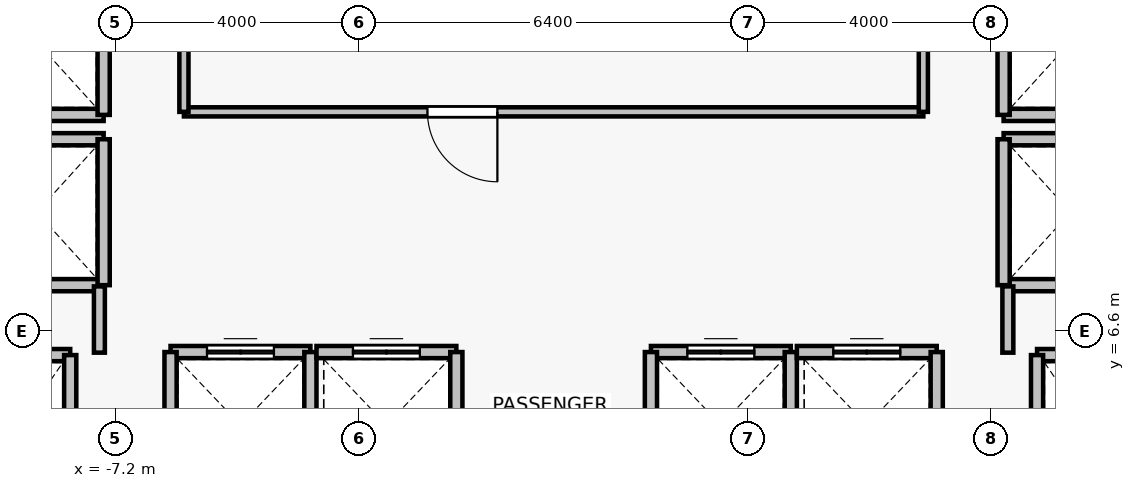
"""IFC4 building model, lengths in metres.
Left out: names, types, materials, properties, quantities, classifications, styles, units other than length and angle.
Written with IfcOpenShell. Run it as: python <this file> out.ifc"""

import sys

from ifc_helpers import new_model, si_unit, direction, frame, frame_2d, origin, place, context, subcontext, project, spatial, rectangle, extrude, source, transform, mapped, element, fill, save


model = new_model("IFC4")
c1 = context("Model", 3, precision=1e-05, world=origin(), true_north=direction((0.0, 1.0)))
c2 = subcontext(c1, "Body", "Model", "MODEL_VIEW")
j1 = project(units=[si_unit("LENGTHUNIT", "METRE"), si_unit("PLANEANGLEUNIT", "RADIAN")], contexts=[c1])
p1 = place(None, origin())
s1 = spatial("IfcSite", under=j1, at=p1, CompositionType="ELEMENT")
p2 = place(p1, origin())
s2 = spatial("IfcBuilding", under=s1, at=p2, CompositionType="ELEMENT")
p3 = place(p2, frame((0.0, 0.0, 126.4)))
s3 = spatial("IfcBuildingStorey", under=s2, at=p3, CompositionType="ELEMENT", Elevation=126.4)
p4 = place(p3, frame((-9.95, 6.2, 0.0), z_axis=(0.0, 0.0, 1.0), x_axis=(1.0, 0.0, 0.0)))
e1 = element("IfcWall", 1, at=p4, inside=s3, PredefinedType="SOLIDWALL", context=c2, shape_type="SweptSolid", body=[
    extrude(rectangle(XDim=2.0, YDim=0.2, at=frame_2d((1.0, 0.0))), origin(), (0.0, 0.0, 1.0), 3.075),
])
p5 = place(p3, frame((-7.95, 6.2, 0.0), z_axis=(0.0, 0.0, 1.0), x_axis=(0.0, -1.0, 0.0)))
e2 = element("IfcWall", 2, at=p5, inside=s3, PredefinedType="SOLIDWALL", context=c2, shape_type="SweptSolid", body=[
    extrude(rectangle(XDim=2.8, YDim=0.2, at=frame_2d((1.4, 0.0))), origin(), (0.0, 0.0, 1.0), 3.075),
])
p6 = place(p3, frame((7.95, 6.2, 0.0), z_axis=(0.0, 0.0, 1.0), x_axis=(1.0, 0.0, 0.0)))
e3 = element("IfcWall", 3, at=p6, inside=s3, PredefinedType="SOLIDWALL", context=c2, shape_type="SweptSolid", body=[
    extrude(rectangle(XDim=2.0, YDim=0.2, at=frame_2d((1.0, 0.0))), origin(), (0.0, 0.0, 1.0), 3.075),
])
p7 = place(p3, frame((7.95, 3.4, 0.0), z_axis=(0.0, 0.0, 1.0), x_axis=(0.0, 1.0, 0.0)))
e4 = element("IfcWall", 4, at=p7, inside=s3, PredefinedType="SOLIDWALL", context=c2, shape_type="SweptSolid", body=[
    extrude(rectangle(XDim=2.8, YDim=0.2, at=frame_2d((1.4, 0.0))), origin(), (0.0, 0.0, 1.0), 3.075),
])
p8 = place(p3, frame((-6.3, 6.25, 0.0), z_axis=(0.0, 0.0, 1.0), x_axis=(1.0, 0.0, 0.0)))
e5 = element("IfcWall", 5, at=p8, inside=s3, PredefinedType="SOLIDWALL", context=c2, shape_type="SweptSolid", body=[
    extrude(rectangle(XDim=2.3, YDim=0.2, at=frame_2d((1.15, 0.0))), origin(), (0.0, 0.0, 1.0), 3.075),
])
p9 = place(p8, frame((0.6, 0.0, 0.0)))
e6 = element("IfcOpeningElement", 6, at=p9, cuts=e5, PredefinedType="OPENING", context=c2, shape_type="SweptSolid", body=[
    extrude(rectangle(XDim=1.1, YDim=2.2, at=frame_2d((0.55, 1.1))), frame((0.0, 0.11, 0.0), z_axis=(0.0, -1.0, 0.0), x_axis=(1.0, 0.0, 0.0)), (0.0, 0.0, 1.0), 0.22),
])
for number, where, z_axis, x_axis in (
    (7, (-6.3, 3.85, 0.0), (0.0, 0.0, 1.0), (0.0, 1.0, 0.0)),
    (8, (-4.0, 6.25, 0.0), (0.0, 0.0, 1.0), (0.0, -1.0, 0.0)),
):
    element("IfcWall", number, at=place(p3, frame(where, z_axis=z_axis, x_axis=x_axis)), inside=s3, PredefinedType="SOLIDWALL", context=c2, shape_type="SweptSolid", body=[
        extrude(rectangle(XDim=2.4, YDim=0.2, at=frame_2d((1.2, 0.0))), origin(), (0.0, 0.0, 1.0), 3.075),
    ])
p10 = place(p3, frame((-3.9, 6.25, 0.0), z_axis=(0.0, 0.0, 1.0), x_axis=(1.0, 0.0, 0.0)))
e9 = element("IfcWall", 9, at=p10, inside=s3, PredefinedType="SOLIDWALL", context=c2, shape_type="SweptSolid", body=[
    extrude(rectangle(XDim=2.3, YDim=0.2, at=frame_2d((1.15, 0.0))), origin(), (0.0, 0.0, 1.0), 3.075),
])
p11 = place(p10, frame((0.6, 0.0, 0.0)))
e10 = element("IfcOpeningElement", 10, at=p11, cuts=e9, PredefinedType="OPENING", context=c2, shape_type="SweptSolid", body=[
    extrude(rectangle(XDim=1.1, YDim=2.2, at=frame_2d((0.55, 1.1))), frame((0.0, 0.11, 0.0), z_axis=(0.0, -1.0, 0.0), x_axis=(1.0, 0.0, 0.0)), (0.0, 0.0, 1.0), 0.22),
])
p12 = place(p3, frame((-1.6, 6.25, 0.0), z_axis=(0.0, 0.0, 1.0), x_axis=(0.0, -1.0, 0.0)))
e11 = element("IfcWall", 11, at=p12, inside=s3, PredefinedType="SOLIDWALL", context=c2, shape_type="SweptSolid", body=[
    extrude(rectangle(XDim=2.4, YDim=0.2, at=frame_2d((1.2, 0.0))), origin(), (0.0, 0.0, 1.0), 3.075),
])
p13 = place(p3, frame((1.6, 6.25, 0.0), z_axis=(0.0, 0.0, 1.0), x_axis=(1.0, 0.0, 0.0)))
e12 = element("IfcWall", 12, at=p13, inside=s3, PredefinedType="SOLIDWALL", context=c2, shape_type="SweptSolid", body=[
    extrude(rectangle(XDim=2.3, YDim=0.2, at=frame_2d((1.15, 0.0))), origin(), (0.0, 0.0, 1.0), 3.075),
])
p14 = place(p13, frame((0.6, 0.0, 0.0)))
e13 = element("IfcOpeningElement", 13, at=p14, cuts=e12, PredefinedType="OPENING", context=c2, shape_type="SweptSolid", body=[
    extrude(rectangle(XDim=1.1, YDim=2.2, at=frame_2d((0.55, 1.1))), frame((0.0, 0.11, 0.0), z_axis=(0.0, -1.0, 0.0), x_axis=(1.0, 0.0, 0.0)), (0.0, 0.0, 1.0), 0.22),
])
for number, where, z_axis, x_axis in (
    (14, (1.6, 3.85, 0.0), (0.0, 0.0, 1.0), (0.0, 1.0, 0.0)),
    (15, (3.9, 6.25, 0.0), (0.0, 0.0, 1.0), (0.0, -1.0, 0.0)),
):
    element("IfcWall", number, at=place(p3, frame(where, z_axis=z_axis, x_axis=x_axis)), inside=s3, PredefinedType="SOLIDWALL", context=c2, shape_type="SweptSolid", body=[
        extrude(rectangle(XDim=2.4, YDim=0.2, at=frame_2d((1.2, 0.0))), origin(), (0.0, 0.0, 1.0), 3.075),
    ])
p15 = place(p3, frame((4.0, 6.25, 0.0), z_axis=(0.0, 0.0, 1.0), x_axis=(1.0, 0.0, 0.0)))
e16 = element("IfcWall", 16, at=p15, inside=s3, PredefinedType="SOLIDWALL", context=c2, shape_type="SweptSolid", body=[
    extrude(rectangle(XDim=2.3, YDim=0.2, at=frame_2d((1.15, 0.0))), origin(), (0.0, 0.0, 1.0), 3.075),
])
p16 = place(p15, frame((0.6, 0.0, 0.0)))
e17 = element("IfcOpeningElement", 17, at=p16, cuts=e16, PredefinedType="OPENING", context=c2, shape_type="SweptSolid", body=[
    extrude(rectangle(XDim=1.1, YDim=2.2, at=frame_2d((0.55, 1.1))), frame((0.0, 0.11, 0.0), z_axis=(0.0, -1.0, 0.0), x_axis=(1.0, 0.0, 0.0)), (0.0, 0.0, 1.0), 0.22),
])
p17 = place(p3, frame((6.3, 6.25, 0.0), z_axis=(0.0, 0.0, 1.0), x_axis=(0.0, -1.0, 0.0)))
e18 = element("IfcWall", 18, at=p17, inside=s3, PredefinedType="SOLIDWALL", context=c2, shape_type="SweptSolid", body=[
    extrude(rectangle(XDim=2.4, YDim=0.2, at=frame_2d((1.2, 0.0))), origin(), (0.0, 0.0, 1.0), 3.075),
])
for number, where, z_axis, x_axis in (
    (19, (-7.4, 7.35, 0.0), (0.0, 0.0, 1.0), (-1.0, 0.0, 0.0)),
    (20, (-9.6, 9.75, 0.0), (0.0, 0.0, 1.0), (1.0, 0.0, 0.0)),
):
    element("IfcWall", number, at=place(p3, frame(where, z_axis=z_axis, x_axis=x_axis)), inside=s3, PredefinedType="SOLIDWALL", context=c2, shape_type="SweptSolid", body=[
        extrude(rectangle(XDim=2.2, YDim=0.2, at=frame_2d((1.1, 0.0))), origin(), (0.0, 0.0, 1.0), 2.515),
    ])
p18 = place(p3, frame((-7.4, 9.75, 0.0), z_axis=(0.0, 0.0, 1.0), x_axis=(0.0, -1.0, 0.0)))
e21 = element("IfcWall", 21, at=p18, inside=s3, PredefinedType="SOLIDWALL", context=c2, shape_type="SweptSolid", body=[
    extrude(rectangle(XDim=2.4, YDim=0.2, at=frame_2d((1.2, 0.0))), origin(), (0.0, 0.0, 1.0), 2.515),
])
p19 = place(p3, frame((-7.4, 10.15, 0.0), z_axis=(0.0, 0.0, 1.0), x_axis=(-1.0, 0.0, 0.0)))
e22 = element("IfcWall", 22, at=p19, inside=s3, PredefinedType="SOLIDWALL", context=c2, shape_type="SweptSolid", body=[
    extrude(rectangle(XDim=2.2, YDim=0.2, at=frame_2d((1.1, 0.0))), origin(), (0.0, 0.0, 1.0), 2.515),
])
p20 = place(p3, frame((-7.4, 12.55, 0.0), z_axis=(0.0, 0.0, 1.0), x_axis=(0.0, -1.0, 0.0)))
e23 = element("IfcWall", 23, at=p20, inside=s3, PredefinedType="SOLIDWALL", context=c2, shape_type="SweptSolid", body=[
    extrude(rectangle(XDim=2.4, YDim=0.2, at=frame_2d((1.2, 0.0))), origin(), (0.0, 0.0, 1.0), 2.515),
])
for number, where, z_axis, x_axis in (
    (24, (9.6, 7.35, 0.0), (0.0, 0.0, 1.0), (-1.0, 0.0, 0.0)),
    (25, (7.4, 9.75, 0.0), (0.0, 0.0, 1.0), (1.0, 0.0, 0.0)),
):
    element("IfcWall", number, at=place(p3, frame(where, z_axis=z_axis, x_axis=x_axis)), inside=s3, PredefinedType="SOLIDWALL", context=c2, shape_type="SweptSolid", body=[
        extrude(rectangle(XDim=2.2, YDim=0.2, at=frame_2d((1.1, 0.0))), origin(), (0.0, 0.0, 1.0), 2.515),
    ])
p21 = place(p3, frame((7.4, 7.35, 0.0), z_axis=(0.0, 0.0, 1.0), x_axis=(0.0, 1.0, 0.0)))
e26 = element("IfcWall", 26, at=p21, inside=s3, PredefinedType="SOLIDWALL", context=c2, shape_type="SweptSolid", body=[
    extrude(rectangle(XDim=2.4, YDim=0.2, at=frame_2d((1.2, 0.0))), origin(), (0.0, 0.0, 1.0), 2.515),
])
p22 = place(p3, frame((9.6, 10.15, 0.0), z_axis=(0.0, 0.0, 1.0), x_axis=(-1.0, 0.0, 0.0)))
e27 = element("IfcWall", 27, at=p22, inside=s3, PredefinedType="SOLIDWALL", context=c2, shape_type="SweptSolid", body=[
    extrude(rectangle(XDim=2.2, YDim=0.2, at=frame_2d((1.1, 0.0))), origin(), (0.0, 0.0, 1.0), 2.515),
])
p23 = place(p3, frame((7.4, 10.15, 0.0), z_axis=(0.0, 0.0, 1.0), x_axis=(0.0, 1.0, 0.0)))
e28 = element("IfcWall", 28, at=p23, inside=s3, PredefinedType="SOLIDWALL", context=c2, shape_type="SweptSolid", body=[
    extrude(rectangle(XDim=2.4, YDim=0.2, at=frame_2d((1.2, 0.0))), origin(), (0.0, 0.0, 1.0), 2.515),
])
for number, where, z_axis, x_axis in (
    (29, (-7.47, 7.33, 0.0), (0.0, 0.0, 1.0), (0.0, -1.0, 0.0)),
    (30, (7.47, 6.24, 0.0), (0.0, 0.0, 1.0), (0.0, 1.0, 0.0)),
):
    element("IfcWall", number, at=place(p3, frame(where, z_axis=z_axis, x_axis=x_axis)), inside=s3, PredefinedType="PARTITIONING", context=c2, shape_type="SweptSolid", body=[
        extrude(rectangle(XDim=1.09, YDim=0.18, at=frame_2d((0.545, 0.0))), origin(), (0.0, 0.0, 1.0), 2.515),
    ])
p24 = place(p3, frame((6.08, 10.2, 0.0), z_axis=(0.0, 0.0, 1.0), x_axis=(-1.0, 0.0, 0.0)))
e31 = element("IfcWall", 31, at=p24, inside=s3, PredefinedType="PARTITIONING", context=c2, shape_type="SweptSolid", body=[
    extrude(rectangle(XDim=12.16, YDim=0.15, at=frame_2d((6.08, 0.0))), origin(), (0.0, 0.0, 1.0), 3.075),
])
p25 = place(p24, frame((7.005, 0.0, 0.0)))
e32 = element("IfcOpeningElement", 32, at=p25, cuts=e31, PredefinedType="OPENING", context=c2, shape_type="SweptSolid", body=[
    extrude(rectangle(XDim=1.15, YDim=2.15, at=frame_2d((0.575, 1.075))), frame((0.0, 0.085, 0.0), z_axis=(0.0, -1.0, 0.0), x_axis=(1.0, 0.0, 0.0)), (0.0, 0.0, 1.0), 0.17),
])
for number, where, z_axis, x_axis in (
    (33, (-6.08, 10.2, 0.0), (0.0, 0.0, 1.0), (0.0, 1.0, 0.0)),
    (34, (6.08, 13.0, 0.0), (0.0, 0.0, 1.0), (0.0, -1.0, 0.0)),
):
    element("IfcWall", number, at=place(p3, frame(where, z_axis=z_axis, x_axis=x_axis)), inside=s3, PredefinedType="PARTITIONING", context=c2, shape_type="SweptSolid", body=[
        extrude(rectangle(XDim=2.8, YDim=0.15, at=frame_2d((1.4, 0.0))), origin(), (0.0, 0.0, 1.0), 3.075),
    ])
m1 = source(origin(), c2, "Body", "SweptSolid", [
    extrude(rectangle(XDim=1.1, YDim=2.2, at=frame_2d((0.55, 1.1))), frame((0.0, 0.025, 0.0), z_axis=(0.0, -1.0, 0.0), x_axis=(1.0, 0.0, 0.0)), (0.0, 0.0, 1.0), 0.05),
])
p26 = place(p9, origin())
e35 = element("IfcDoor", 35, at=p26, inside=s3, OperationType="DOUBLE_DOOR_SLIDING", PredefinedType="DOOR", context=c2, shape_type="MappedRepresentation", body=[
    mapped(m1, transform((0.0, 0.0, 0.0), x_axis=(1.0, 0.0, 0.0), y_axis=(0.0, 1.0, 0.0), z_axis=(0.0, 0.0, 1.0), scale=1.0)),
])
fill(e6, e35)
p27 = place(p11, origin())
e36 = element("IfcDoor", 36, at=p27, inside=s3, OperationType="DOUBLE_DOOR_SLIDING", PredefinedType="DOOR", context=c2, shape_type="MappedRepresentation", body=[
    mapped(m1, transform((0.0, 0.0, 0.0), x_axis=(1.0, 0.0, 0.0), y_axis=(0.0, 1.0, 0.0), z_axis=(0.0, 0.0, 1.0), scale=1.0)),
])
fill(e10, e36)
p28 = place(p14, origin())
e37 = element("IfcDoor", 37, at=p28, inside=s3, OperationType="DOUBLE_DOOR_SLIDING", PredefinedType="DOOR", context=c2, shape_type="MappedRepresentation", body=[
    mapped(m1, transform((0.0, 0.0, 0.0), x_axis=(1.0, 0.0, 0.0), y_axis=(0.0, 1.0, 0.0), z_axis=(0.0, 0.0, 1.0), scale=1.0)),
])
fill(e13, e37)
p29 = place(p16, origin())
e38 = element("IfcDoor", 38, at=p29, inside=s3, OperationType="DOUBLE_DOOR_SLIDING", PredefinedType="DOOR", context=c2, shape_type="MappedRepresentation", body=[
    mapped(m1, transform((0.0, 0.0, 0.0), x_axis=(1.0, 0.0, 0.0), y_axis=(0.0, 1.0, 0.0), z_axis=(0.0, 0.0, 1.0), scale=1.0)),
])
fill(e17, e38)
m2 = source(origin(), c2, "Body", "SweptSolid", [
    extrude(rectangle(XDim=1.15, YDim=2.15, at=frame_2d((0.575, 1.075))), frame((0.0, 0.025, 0.0), z_axis=(0.0, -1.0, 0.0), x_axis=(1.0, 0.0, 0.0)), (0.0, 0.0, 1.0), 0.05),
])
p30 = place(p25, origin())
e39 = element("IfcDoor", 39, at=p30, inside=s3, OperationType="SINGLE_SWING_LEFT", PredefinedType="DOOR", context=c2, shape_type="MappedRepresentation", body=[
    mapped(m2, transform((0.0, 0.0, 0.0), x_axis=(1.0, 0.0, 0.0), y_axis=(0.0, 1.0, 0.0), z_axis=(0.0, 0.0, 1.0), scale=1.0)),
])
fill(e32, e39)
save(model, sys.argv[1])
